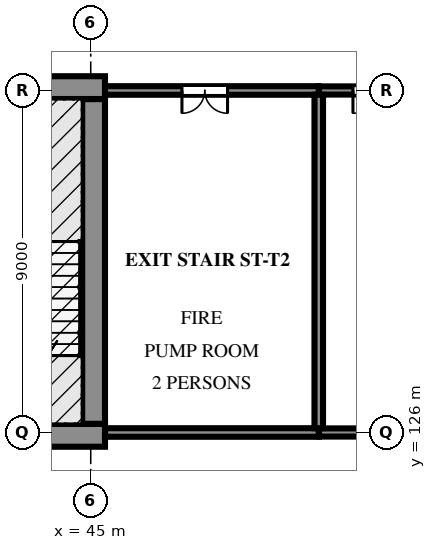
"""IFC4 building model, lengths in metres.
Left out: names, types, materials, properties, quantities, classifications, styles, units other than length and angle.
Written with IfcOpenShell. Run it as: python <this file> out.ifc"""

import sys

from ifc_helpers import new_model, si_unit, direction, frame, frame_2d, origin, place, context, subcontext, project, spatial, polyline, rectangle, outline, extrude, element, fill, save


model = new_model("IFC4")
c1 = context("Model", 3, precision=1e-05, world=origin(), true_north=direction((0.0, 1.0)))
c2 = subcontext(c1, "Body", "Model", "MODEL_VIEW")
j1 = project(units=[si_unit("LENGTHUNIT", "METRE"), si_unit("PLANEANGLEUNIT", "RADIAN")], contexts=[c1])
p1 = place(None, origin())
s1 = spatial("IfcSite", under=j1, at=p1, CompositionType="ELEMENT")
p2 = place(p1, origin())
s2 = spatial("IfcBuilding", under=s1, at=p2, CompositionType="ELEMENT")
p3 = place(p2, origin())
s3 = spatial("IfcBuildingStorey", under=s2, at=p3, CompositionType="ELEMENT", Elevation=0.0)
p4 = place(p3, frame((26.625, 125.925, -2.1), z_axis=(0.0, 0.0, 1.0), x_axis=(1.0, 0.0, 0.0)))
e1 = element("IfcWall", 1, at=p4, inside=s3, PredefinedType="SOLIDWALL", context=c2, shape_type="SweptSolid", body=[
    extrude(rectangle(XDim=18.75, YDim=0.6, at=frame_2d((9.375, 0.0))), origin(), (0.0, 0.0, 1.0), 9.6),
])
p5 = place(p4, frame((1.575, 0.0, 2.1)))
e2 = element("IfcOpeningElement", 2, at=p5, cuts=e1, PredefinedType="OPENING", context=c2, shape_type="SweptSolid", body=[
    extrude(rectangle(XDim=1.8, YDim=2.1, at=frame_2d((0.9, 1.05))), frame((0.0, 0.31, 0.0), z_axis=(0.0, -1.0, 0.0), x_axis=(1.0, 0.0, 0.0)), (0.0, 0.0, 1.0), 0.62),
])
p6 = place(p4, frame((12.325, 0.0, 2.1)))
e3 = element("IfcOpeningElement", 3, at=p6, cuts=e1, PredefinedType="OPENING", context=c2, shape_type="SweptSolid", body=[
    extrude(rectangle(XDim=0.7, YDim=2.0, at=frame_2d((0.35, 1.0))), frame((0.0, 0.31, 0.0), z_axis=(0.0, -1.0, 0.0), x_axis=(1.0, 0.0, 0.0)), (0.0, 0.0, 1.0), 0.62),
])
p7 = place(p3, frame((26.625, 135.075, -2.1), z_axis=(0.0, 0.0, 1.0), x_axis=(1.0, 0.0, 0.0)))
e4 = element("IfcWall", 4, at=p7, inside=s3, PredefinedType="SOLIDWALL", context=c2, shape_type="SweptSolid", body=[
    extrude(rectangle(XDim=18.75, YDim=0.6, at=frame_2d((9.375, 0.0))), origin(), (0.0, 0.0, 1.0), 9.6),
])
p8 = place(p7, frame((15.375, 0.0, 2.1)))
e5 = element("IfcOpeningElement", 5, at=p8, cuts=e4, PredefinedType="OPENING", context=c2, shape_type="SweptSolid", body=[
    extrude(rectangle(XDim=1.8, YDim=2.1, at=frame_2d((0.9, 1.05))), frame((0.0, 0.31, 0.0), z_axis=(0.0, -1.0, 0.0), x_axis=(1.0, 0.0, 0.0)), (0.0, 0.0, 1.0), 0.62),
])
p9 = place(p7, frame((6.975, 0.0, 2.1)))
e6 = element("IfcOpeningElement", 6, at=p9, cuts=e4, PredefinedType="OPENING", context=c2, shape_type="SweptSolid", body=[
    extrude(rectangle(XDim=1.2, YDim=2.1, at=frame_2d((0.6, 1.05))), frame((0.0, 0.31, 0.0), z_axis=(0.0, -1.0, 0.0), x_axis=(1.0, 0.0, 0.0)), (0.0, 0.0, 1.0), 0.62),
])
p10 = place(p7, frame((12.275, 0.0, 2.1)))
e7 = element("IfcOpeningElement", 7, at=p10, cuts=e4, PredefinedType="OPENING", context=c2, shape_type="SweptSolid", body=[
    extrude(rectangle(XDim=1.2, YDim=2.1, at=frame_2d((0.6, 1.05))), frame((0.0, 0.31, 0.0), z_axis=(0.0, -1.0, 0.0), x_axis=(1.0, 0.0, 0.0)), (0.0, 0.0, 1.0), 0.62),
])
p11 = place(p3, frame((45.075, 126.225, -2.1), z_axis=(0.0, 0.0, 1.0), x_axis=(0.0, 1.0, 0.0)))
e8 = element("IfcWall", 8, at=p11, inside=s3, PredefinedType="SOLIDWALL", context=c2, shape_type="SweptSolid", body=[
    extrude(rectangle(XDim=8.55, YDim=0.6, at=frame_2d((4.275, 0.0))), origin(), (0.0, 0.0, 1.0), 9.6),
])
p12 = place(p3, frame((53.794, 135.0, 0.0), z_axis=(0.0, 0.0, 1.0), x_axis=(-1.0, 0.0, 0.0)))
e9 = element("IfcWall", 9, at=p12, inside=s3, PredefinedType="PARTITIONING", context=c2, shape_type="SweptSolid", body=[
    extrude(rectangle(XDim=2.794, YDim=0.215, at=frame_2d((1.397, 0.0))), origin(), (0.0, 0.0, 1.0), 6.6),
])
p13 = place(p12, frame((0.694, 0.0, 0.0)))
e10 = element("IfcOpeningElement", 10, at=p13, cuts=e9, PredefinedType="OPENING", context=c2, shape_type="SweptSolid", body=[
    extrude(rectangle(XDim=1.2, YDim=2.4, at=frame_2d((0.6, 1.2))), frame((0.0, 0.117, 0.0), z_axis=(0.0, -1.0, 0.0), x_axis=(1.0, 0.0, 0.0)), (0.0, 0.0, 1.0), 0.235),
])
p14 = place(p3, frame((51.0, 126.0, 0.0), z_axis=(0.0, 0.0, 1.0), x_axis=(1.0, 0.0, 0.0)))
e11 = element("IfcWall", 11, at=p14, inside=s3, PredefinedType="PARTITIONING", context=c2, shape_type="SweptSolid", body=[
    extrude(rectangle(XDim=2.794, YDim=0.215, at=frame_2d((1.397, 0.0))), origin(), (0.0, 0.0, 1.0), 6.6),
])
p15 = place(p3, frame((51.0, 135.0, 0.0), z_axis=(0.0, 0.0, 1.0), x_axis=(-1.0, 0.0, 0.0)))
e12 = element("IfcWall", 12, at=p15, inside=s3, PredefinedType="PARTITIONING", context=c2, shape_type="SweptSolid", body=[
    extrude(rectangle(XDim=5.623, YDim=0.225, at=frame_2d((2.812, 0.0))), origin(), (0.0, 0.0, 1.0), 6.6),
])
p16 = place(p15, frame((2.4, 0.0, 0.0)))
e13 = element("IfcOpeningElement", 13, at=p16, cuts=e12, PredefinedType="OPENING", context=c2, shape_type="SweptSolid", body=[
    extrude(rectangle(XDim=1.2, YDim=2.4, at=frame_2d((0.6, 1.2))), frame((0.0, 0.123, 0.0), z_axis=(0.0, -1.0, 0.0), x_axis=(1.0, 0.0, 0.0)), (0.0, 0.0, 1.0), 0.245),
])
p17 = place(p3, frame((45.377, 126.0, 0.0), z_axis=(0.0, 0.0, 1.0), x_axis=(1.0, 0.0, 0.0)))
e14 = element("IfcWall", 14, at=p17, inside=s3, PredefinedType="PARTITIONING", context=c2, shape_type="SweptSolid", body=[
    extrude(rectangle(XDim=5.623, YDim=0.225, at=frame_2d((2.812, 0.0))), origin(), (0.0, 0.0, 1.0), 6.6),
])
p18 = place(p3, frame((51.0, 134.887, 0.0), z_axis=(0.0, 0.0, 1.0), x_axis=(0.0, -1.0, 0.0)))
e15 = element("IfcWall", 15, at=p18, inside=s3, PredefinedType="PARTITIONING", context=c2, shape_type="SweptSolid", body=[
    extrude(rectangle(XDim=8.775, YDim=0.225, at=frame_2d((4.387, 0.0))), origin(), (0.0, 0.0, 1.0), 6.6),
])
p19 = place(p16, origin())
e16 = element("IfcDoor", 16, at=p19, inside=s3, OperationType="DOUBLE_DOOR_SINGLE_SWING", PredefinedType="DOOR", context=c2, shape_type="SweptSolid", body=[
    extrude(outline(polyline([(0.0, 0.0), (0.07, 0.0), (0.07, 2.33), (1.13, 2.33), (1.13, 0.0), (1.2, 0.0), (1.2, 2.4), (0.0, 2.4), (0.0, 0.0)])), frame((0.0, 0.025, 0.0), z_axis=(0.0, -1.0, 0.0), x_axis=(1.0, 0.0, 0.0)), (0.0, 0.0, 1.0), 0.05),
    extrude(outline(polyline([(0.074, 0.01), (0.597, 0.01), (0.597, 2.326), (0.074, 2.326), (0.074, 0.01)]), holes=[polyline([(0.178, 0.427), (0.492, 0.427), (0.492, 2.048), (0.178, 2.048), (0.178, 0.427)])]), frame((0.0, 0.017, 0.0), z_axis=(0.0, -1.0, 0.0), x_axis=(1.0, 0.0, 0.0)), (0.0, 0.0, 1.0), 0.035),
    extrude(rectangle(XDim=0.314, YDim=1.621, at=frame_2d((0.335, 1.237))), frame((0.0, 0.009, 0.0), z_axis=(0.0, -1.0, 0.0), x_axis=(1.0, 0.0, 0.0)), (0.0, 0.0, 1.0), 0.017),
    extrude(outline(polyline([(0.603, 0.01), (1.126, 0.01), (1.126, 2.326), (0.603, 2.326), (0.603, 0.01)]), holes=[polyline([(0.708, 0.427), (1.021, 0.427), (1.021, 2.048), (0.708, 2.048), (0.708, 0.427)])]), frame((0.0, 0.017, 0.0), z_axis=(0.0, -1.0, 0.0), x_axis=(1.0, 0.0, 0.0)), (0.0, 0.0, 1.0), 0.035),
    extrude(rectangle(XDim=0.314, YDim=1.621, at=frame_2d((0.865, 1.237))), frame((0.0, 0.009, 0.0), z_axis=(0.0, -1.0, 0.0), x_axis=(1.0, 0.0, 0.0)), (0.0, 0.0, 1.0), 0.017),
])
fill(e13, e16)
p20 = place(p13, origin())
e17 = element("IfcDoor", 17, at=p20, inside=s3, OperationType="DOUBLE_DOOR_SINGLE_SWING", PredefinedType="DOOR", context=c2, shape_type="SweptSolid", body=[
    extrude(outline(polyline([(0.0, 0.0), (0.07, 0.0), (0.07, 2.33), (1.13, 2.33), (1.13, 0.0), (1.2, 0.0), (1.2, 2.4), (0.0, 2.4), (0.0, 0.0)])), frame((0.0, 0.025, 0.0), z_axis=(0.0, -1.0, 0.0), x_axis=(1.0, 0.0, 0.0)), (0.0, 0.0, 1.0), 0.05),
    extrude(outline(polyline([(0.074, 0.01), (0.597, 0.01), (0.597, 2.326), (0.074, 2.326), (0.074, 0.01)]), holes=[polyline([(0.178, 0.427), (0.492, 0.427), (0.492, 2.048), (0.178, 2.048), (0.178, 0.427)])]), frame((0.0, 0.017, 0.0), z_axis=(0.0, -1.0, 0.0), x_axis=(1.0, 0.0, 0.0)), (0.0, 0.0, 1.0), 0.035),
    extrude(rectangle(XDim=0.314, YDim=1.621, at=frame_2d((0.335, 1.237))), frame((0.0, 0.009, 0.0), z_axis=(0.0, -1.0, 0.0), x_axis=(1.0, 0.0, 0.0)), (0.0, 0.0, 1.0), 0.017),
    extrude(outline(polyline([(0.603, 0.01), (1.126, 0.01), (1.126, 2.326), (0.603, 2.326), (0.603, 0.01)]), holes=[polyline([(0.708, 0.427), (1.021, 0.427), (1.021, 2.048), (0.708, 2.048), (0.708, 0.427)])]), frame((0.0, 0.017, 0.0), z_axis=(0.0, -1.0, 0.0), x_axis=(1.0, 0.0, 0.0)), (0.0, 0.0, 1.0), 0.035),
    extrude(rectangle(XDim=0.314, YDim=1.621, at=frame_2d((0.865, 1.237))), frame((0.0, 0.009, 0.0), z_axis=(0.0, -1.0, 0.0), x_axis=(1.0, 0.0, 0.0)), (0.0, 0.0, 1.0), 0.017),
])
fill(e10, e17)
save(model, sys.argv[1])
